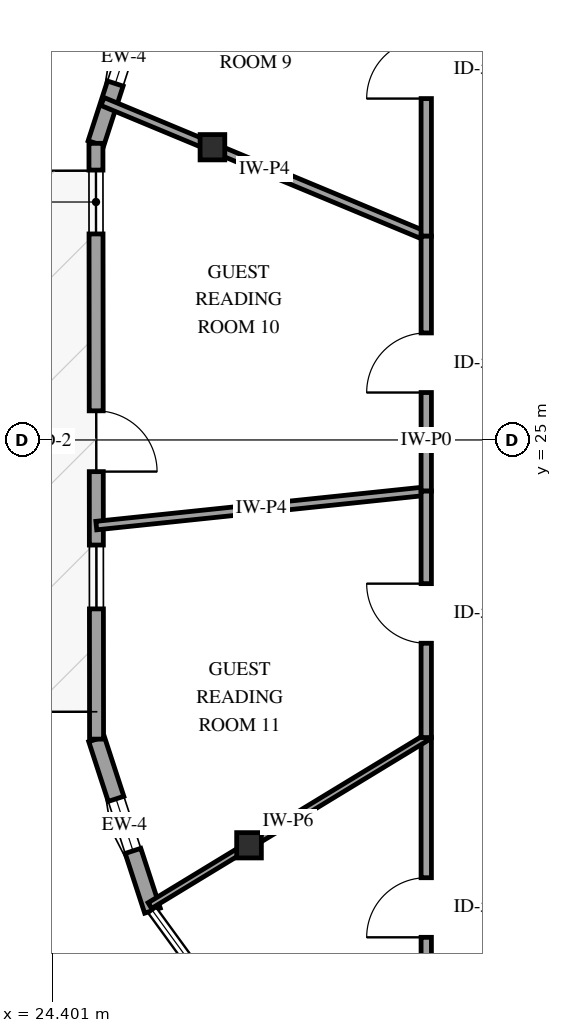
"""IFC4 building model, lengths in metres.
Left out: names, types, materials, properties, quantities, classifications, styles, units other than length and angle.
Written with IfcOpenShell. Run it as: python <this file> out.ifc"""

import sys

from ifc_helpers import new_model, si_unit, direction, frame, frame_2d, origin, origin_2d, place, context, subcontext, project, spatial, rectangle, i_section, extrude, element, fill, save


model = new_model("IFC4")
c1 = context("Model", 3, precision=1e-05, world=origin(), true_north=direction((0.0, 1.0)))
c2 = subcontext(c1, "Body", "Model", "MODEL_VIEW")
j1 = project(units=[si_unit("LENGTHUNIT", "METRE"), si_unit("PLANEANGLEUNIT", "RADIAN")], contexts=[c1])
p1 = place(None, origin())
s1 = spatial("IfcSite", under=j1, at=p1, CompositionType="ELEMENT")
p2 = place(p1, origin())
s2 = spatial("IfcBuilding", under=s1, at=p2, CompositionType="ELEMENT")
p3 = place(p2, frame((0.0, 0.0, 230.2)))
s3 = spatial("IfcBuildingStorey", under=s2, at=p3, CompositionType="ELEMENT", Elevation=230.2)
for number, where, z_axis, x_axis in (
    (1, (27.034, 29.814, 0.0), (0.0, 0.0, 1.0), (1.0, 0.0, 0.0)),
    (2, (27.635, 18.334, 0.0), (0.0, 0.0, 1.0), (1.0, 0.0, 0.0)),
):
    element("IfcColumn", number, at=place(p3, frame(where, z_axis=z_axis, x_axis=x_axis)), inside=s3, PredefinedType="COLUMN", context=c2, shape_type="SweptSolid", body=[
        extrude(i_section(OverallWidth=0.406, OverallDepth=0.416, WebThickness=0.03, FlangeThickness=0.048, FilletRadius=0.038, at=origin_2d()), origin(), (0.0, 0.0, 1.0), 3.6),
    ])
p4 = place(p3, frame((26.031, 32.7, 0.0), z_axis=(0.0, 0.0, 1.0), x_axis=(-0.307945174151, -0.95140410432, 0.0)))
e3 = element("IfcWall", 3, at=p4, inside=s3, PredefinedType="SOLIDWALL", context=c2, shape_type="SweptSolid", body=[
    extrude(rectangle(XDim=2.967, YDim=0.27, at=frame_2d((1.483, 0.0))), origin(), (0.0, 0.0, 1.0), 2.679),
])
p5 = place(p4, frame((1.033, 0.0, 0.75)))
e4 = element("IfcOpeningElement", 4, at=p5, cuts=e3, PredefinedType="OPENING", context=c2, shape_type="SweptSolid", body=[
    extrude(rectangle(XDim=0.9, YDim=1.5, at=frame_2d((0.45, 0.75))), frame((0.0, 0.145, 0.0), z_axis=(0.0, -1.0, 0.0), x_axis=(1.0, 0.0, 0.0)), (0.0, 0.0, 1.0), 0.29),
])
p6 = place(p3, frame((25.128, 20.08, 0.0), z_axis=(0.0, 0.0, 1.0), x_axis=(0.309949441634, -0.950753040295, 0.0)))
e5 = element("IfcWall", 5, at=p6, inside=s3, PredefinedType="SOLIDWALL", context=c2, shape_type="SweptSolid", body=[
    extrude(rectangle(XDim=2.966, YDim=0.27, at=frame_2d((1.483, 0.0))), origin(), (0.0, 0.0, 1.0), 2.679),
])
p7 = place(p6, frame((1.033, 0.0, 0.75)))
e6 = element("IfcOpeningElement", 6, at=p7, cuts=e5, PredefinedType="OPENING", context=c2, shape_type="SweptSolid", body=[
    extrude(rectangle(XDim=0.9, YDim=1.5, at=frame_2d((0.45, 0.75))), frame((0.0, 0.145, 0.0), z_axis=(0.0, -1.0, 0.0), x_axis=(1.0, 0.0, 0.0)), (0.0, 0.0, 1.0), 0.29),
])
p8 = place(p3, frame((25.118, 29.878, 0.0), z_axis=(0.0, 0.0, 1.0), x_axis=(0.001046571902, -0.999999452343, 0.0)))
e7 = element("IfcWall", 7, at=p8, inside=s3, PredefinedType="SOLIDWALL", context=c2, shape_type="SweptSolid", body=[
    extrude(rectangle(XDim=9.798, YDim=0.23, at=frame_2d((4.899, 0.0))), origin(), (0.0, 0.0, 1.0), 2.679),
])
p9 = place(p8, frame((4.399, 0.0, 0.0)))
e8 = element("IfcOpeningElement", 8, at=p9, cuts=e7, PredefinedType="OPENING", context=c2, shape_type="SweptSolid", body=[
    extrude(rectangle(XDim=1.0, YDim=2.15, at=frame_2d((0.5, 1.075))), frame((0.0, 0.125, 0.0), z_axis=(0.0, -1.0, 0.0), x_axis=(1.0, 0.0, 0.0)), (0.0, 0.0, 1.0), 0.25),
])
p10 = place(p8, frame((0.44, 0.0, 0.72)))
e9 = element("IfcOpeningElement", 9, at=p10, cuts=e7, PredefinedType="OPENING", context=c2, shape_type="SweptSolid", body=[
    extrude(rectangle(XDim=1.05, YDim=1.55, at=frame_2d((0.525, 0.775))), frame((0.0, 0.125, 0.0), z_axis=(0.0, -1.0, 0.0), x_axis=(1.0, 0.0, 0.0)), (0.0, 0.0, 1.0), 0.25),
])
p11 = place(p8, frame((6.606, 0.0, 0.72)))
e10 = element("IfcOpeningElement", 10, at=p11, cuts=e7, PredefinedType="OPENING", context=c2, shape_type="SweptSolid", body=[
    extrude(rectangle(XDim=1.05, YDim=1.55, at=frame_2d((0.525, 0.775))), frame((0.0, 0.125, 0.0), z_axis=(0.0, -1.0, 0.0), x_axis=(1.0, 0.0, 0.0)), (0.0, 0.0, 1.0), 0.25),
])
p12 = place(p3, frame((30.55, 28.351, 0.0), z_axis=(0.0, 0.0, 1.0), x_axis=(-0.923290981213, 0.384101241875, 0.0)))
e11 = element("IfcWall", 11, at=p12, inside=s3, PredefinedType="PARTITIONING", context=c2, shape_type="SweptSolid", body=[
    extrude(rectangle(XDim=5.766, YDim=0.14, at=frame_2d((2.883, 0.0))), origin(), (0.0, 0.0, 1.0), 3.3),
])
p13 = place(p3, frame((30.55, 14.485, 0.0), z_axis=(0.0, 0.0, 1.0), x_axis=(0.0, 1.0, 0.0)))
e12 = element("IfcWall", 12, at=p13, inside=s3, PredefinedType="PARTITIONING", context=c2, shape_type="SweptSolid", body=[
    extrude(rectangle(XDim=5.621, YDim=0.17, at=frame_2d((2.811, 0.0))), origin(), (0.0, 0.0, 1.0), 3.3),
])
p14 = place(p13, frame((2.336, 0.0, 0.0)))
e13 = element("IfcOpeningElement", 13, at=p14, cuts=e12, PredefinedType="OPENING", context=c2, shape_type="SweptSolid", body=[
    extrude(rectangle(XDim=0.98, YDim=2.15, at=frame_2d((0.49, 1.075))), frame((0.0, 0.095, 0.0), z_axis=(0.0, -1.0, 0.0), x_axis=(1.0, 0.0, 0.0)), (0.0, 0.0, 1.0), 0.19),
])
p15 = place(p3, frame((30.55, 28.351, 0.0), z_axis=(0.0, 0.0, 1.0), x_axis=(0.0, 1.0, 0.0)))
e14 = element("IfcWall", 14, at=p15, inside=s3, PredefinedType="PARTITIONING", context=c2, shape_type="SweptSolid", body=[
    extrude(rectangle(XDim=5.476, YDim=0.17, at=frame_2d((2.738, 0.0))), origin(), (0.0, 0.0, 1.0), 3.3),
])
p16 = place(p15, frame((2.263, 0.0, 0.0)))
e15 = element("IfcOpeningElement", 15, at=p16, cuts=e14, PredefinedType="OPENING", context=c2, shape_type="SweptSolid", body=[
    extrude(rectangle(XDim=0.98, YDim=2.15, at=frame_2d((0.49, 1.075))), frame((0.0, 0.095, 0.0), z_axis=(0.0, -1.0, 0.0), x_axis=(1.0, 0.0, 0.0)), (0.0, 0.0, 1.0), 0.19),
])
p17 = place(p3, frame((30.55, 24.159, 0.0), z_axis=(0.0, 0.0, 1.0), x_axis=(-0.994586561879, -0.103911360931, 0.0)))
e16 = element("IfcWall", 16, at=p17, inside=s3, PredefinedType="PARTITIONING", context=c2, shape_type="SweptSolid", body=[
    extrude(rectangle(XDim=5.456, YDim=0.14, at=frame_2d((2.728, 0.0))), origin(), (0.0, 0.0, 1.0), 3.3),
])
p18 = place(p3, frame((30.55, 20.106, 0.0), z_axis=(0.0, 0.0, 1.0), x_axis=(-0.854505962671, -0.519441584549, 0.0)))
e17 = element("IfcWall", 17, at=p18, inside=s3, PredefinedType="PARTITIONING", context=c2, shape_type="SweptSolid", body=[
    extrude(rectangle(XDim=5.319, YDim=0.11, at=frame_2d((2.66, 0.0))), origin(), (0.0, 0.0, 1.0), 2.678),
])
p19 = place(p3, frame((30.55, 24.159, 0.0), z_axis=(0.0, 0.0, 1.0), x_axis=(0.0, 1.0, 0.0)))
e18 = element("IfcWall", 18, at=p19, inside=s3, PredefinedType="PARTITIONING", context=c2, shape_type="SweptSolid", body=[
    extrude(rectangle(XDim=4.192, YDim=0.17, at=frame_2d((2.096, 0.0))), origin(), (0.0, 0.0, 1.0), 3.3),
])
p20 = place(p19, frame((1.621, 0.0, 0.0)))
e19 = element("IfcOpeningElement", 19, at=p20, cuts=e18, PredefinedType="OPENING", context=c2, shape_type="SweptSolid", body=[
    extrude(rectangle(XDim=0.98, YDim=2.15, at=frame_2d((0.49, 1.075))), frame((0.0, 0.095, 0.0), z_axis=(0.0, -1.0, 0.0), x_axis=(1.0, 0.0, 0.0)), (0.0, 0.0, 1.0), 0.19),
])
p21 = place(p3, frame((30.55, 20.106, 0.0), z_axis=(0.0, 0.0, 1.0), x_axis=(0.0, 1.0, 0.0)))
e20 = element("IfcWall", 20, at=p21, inside=s3, PredefinedType="PARTITIONING", context=c2, shape_type="SweptSolid", body=[
    extrude(rectangle(XDim=4.053, YDim=0.17, at=frame_2d((2.026, 0.0))), origin(), (0.0, 0.0, 1.0), 3.3),
])
p22 = place(p21, frame((1.551, 0.0, 0.0)))
e21 = element("IfcOpeningElement", 21, at=p22, cuts=e20, PredefinedType="OPENING", context=c2, shape_type="SweptSolid", body=[
    extrude(rectangle(XDim=0.98, YDim=2.15, at=frame_2d((0.49, 1.075))), frame((0.0, 0.095, 0.0), z_axis=(0.0, -1.0, 0.0), x_axis=(1.0, 0.0, 0.0)), (0.0, 0.0, 1.0), 0.19),
])
p23 = place(p5, origin())
e22 = element("IfcWindow", 22, at=p23, inside=s3, PartitioningType="SINGLE_PANEL", PredefinedType="WINDOW", context=c2, shape_type="SweptSolid", body=[
    extrude(rectangle(XDim=0.9, YDim=1.5, at=frame_2d((0.45, 0.75))), frame((0.0, 0.03, 0.0), z_axis=(0.0, -1.0, 0.0), x_axis=(1.0, 0.0, 0.0)), (0.0, 0.0, 1.0), 0.06),
])
fill(e4, e22)
p24 = place(p7, origin())
e23 = element("IfcWindow", 23, at=p24, inside=s3, PartitioningType="SINGLE_PANEL", PredefinedType="WINDOW", context=c2, shape_type="SweptSolid", body=[
    extrude(rectangle(XDim=0.9, YDim=1.5, at=frame_2d((0.45, 0.75))), frame((0.0, 0.03, 0.0), z_axis=(0.0, -1.0, 0.0), x_axis=(1.0, 0.0, 0.0)), (0.0, 0.0, 1.0), 0.06),
])
fill(e6, e23)
p25 = place(p9, origin())
e24 = element("IfcDoor", 24, at=p25, inside=s3, OperationType="SINGLE_SWING_RIGHT", PredefinedType="DOOR", context=c2, shape_type="SweptSolid", body=[
    extrude(rectangle(XDim=1.0, YDim=2.15, at=frame_2d((0.5, 1.075))), frame((0.0, 0.025, 0.0), z_axis=(0.0, -1.0, 0.0), x_axis=(1.0, 0.0, 0.0)), (0.0, 0.0, 1.0), 0.05),
])
fill(e8, e24)
p26 = place(p10, origin())
e25 = element("IfcWindow", 25, at=p26, inside=s3, PartitioningType="SINGLE_PANEL", PredefinedType="WINDOW", context=c2, shape_type="SweptSolid", body=[
    extrude(rectangle(XDim=1.05, YDim=1.55, at=frame_2d((0.525, 0.775))), frame((0.0, 0.03, 0.0), z_axis=(0.0, -1.0, 0.0), x_axis=(1.0, 0.0, 0.0)), (0.0, 0.0, 1.0), 0.06),
])
fill(e9, e25)
p27 = place(p11, origin())
e26 = element("IfcWindow", 26, at=p27, inside=s3, PartitioningType="SINGLE_PANEL", PredefinedType="WINDOW", context=c2, shape_type="SweptSolid", body=[
    extrude(rectangle(XDim=1.05, YDim=1.55, at=frame_2d((0.525, 0.775))), frame((0.0, 0.03, 0.0), z_axis=(0.0, -1.0, 0.0), x_axis=(1.0, 0.0, 0.0)), (0.0, 0.0, 1.0), 0.06),
])
fill(e10, e26)
p28 = place(p14, origin())
e27 = element("IfcDoor", 27, at=p28, inside=s3, OperationType="SINGLE_SWING_LEFT", PredefinedType="DOOR", context=c2, shape_type="SweptSolid", body=[
    extrude(rectangle(XDim=0.98, YDim=2.15, at=frame_2d((0.49, 1.075))), frame((0.0, 0.025, 0.0), z_axis=(0.0, -1.0, 0.0), x_axis=(1.0, 0.0, 0.0)), (0.0, 0.0, 1.0), 0.05),
])
fill(e13, e27)
p29 = place(p16, origin())
e28 = element("IfcDoor", 28, at=p29, inside=s3, OperationType="SINGLE_SWING_LEFT", PredefinedType="DOOR", context=c2, shape_type="SweptSolid", body=[
    extrude(rectangle(XDim=0.98, YDim=2.15, at=frame_2d((0.49, 1.075))), frame((0.0, 0.025, 0.0), z_axis=(0.0, -1.0, 0.0), x_axis=(1.0, 0.0, 0.0)), (0.0, 0.0, 1.0), 0.05),
])
fill(e15, e28)
p30 = place(p20, origin())
e29 = element("IfcDoor", 29, at=p30, inside=s3, OperationType="SINGLE_SWING_LEFT", PredefinedType="DOOR", context=c2, shape_type="SweptSolid", body=[
    extrude(rectangle(XDim=0.98, YDim=2.15, at=frame_2d((0.49, 1.075))), frame((0.0, 0.025, 0.0), z_axis=(0.0, -1.0, 0.0), x_axis=(1.0, 0.0, 0.0)), (0.0, 0.0, 1.0), 0.05),
])
fill(e19, e29)
p31 = place(p22, origin())
e30 = element("IfcDoor", 30, at=p31, inside=s3, OperationType="SINGLE_SWING_RIGHT", PredefinedType="DOOR", context=c2, shape_type="SweptSolid", body=[
    extrude(rectangle(XDim=0.98, YDim=2.15, at=frame_2d((0.49, 1.075))), frame((0.0, 0.025, 0.0), z_axis=(0.0, -1.0, 0.0), x_axis=(1.0, 0.0, 0.0)), (0.0, 0.0, 1.0), 0.05),
])
fill(e21, e30)
save(model, sys.argv[1])
